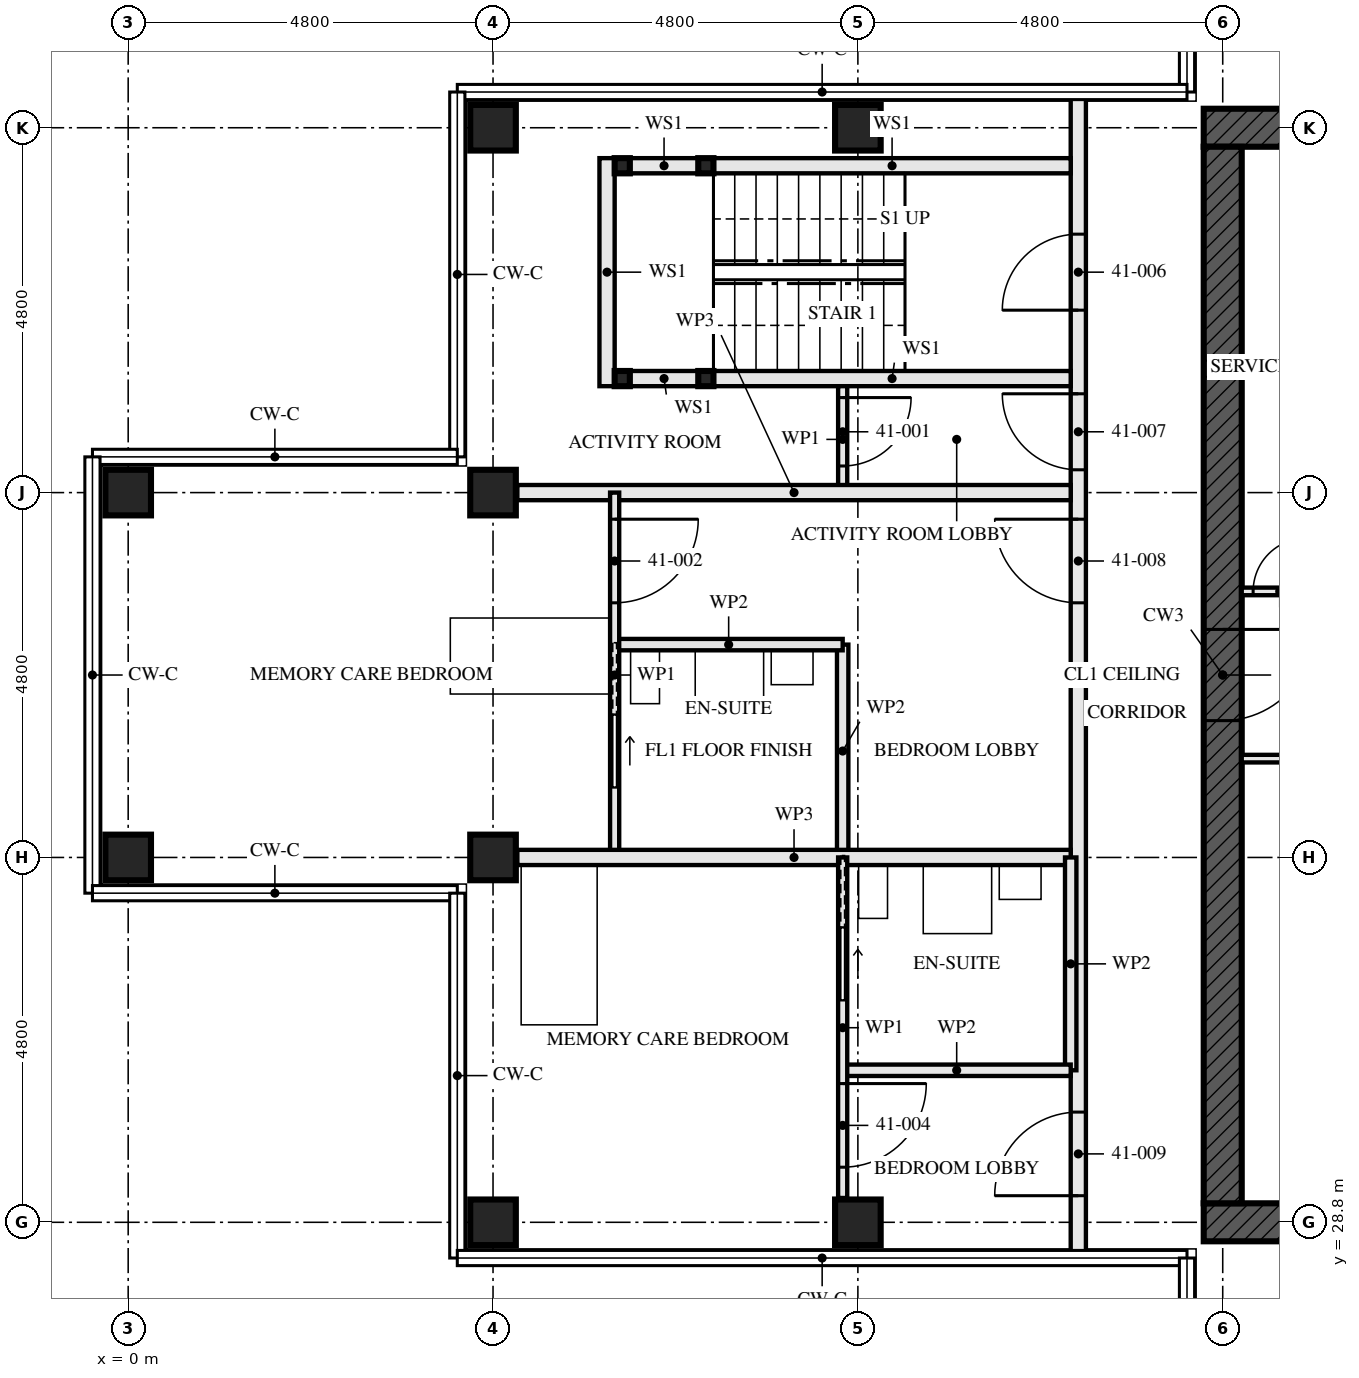
"""IFC4 building model, lengths in metres.
Left out: names, types, materials, properties, quantities, classifications, styles, units other than length and angle.
Written with IfcOpenShell. Run it as: python <this file> out.ifc"""

import sys

from ifc_helpers import new_model, si_unit, direction, frame, frame_2d, origin, origin_2d, place, context, subcontext, project, spatial, rectangle, hollow_rectangle, extrude, element, fill, save


model = new_model("IFC4")
c1 = context("Model", 3, precision=1e-05, world=origin(), true_north=direction((0.0, 1.0)))
c2 = subcontext(c1, "Body", "Model", "MODEL_VIEW")
j1 = project(units=[si_unit("LENGTHUNIT", "METRE"), si_unit("PLANEANGLEUNIT", "RADIAN")], contexts=[c1])
p1 = place(None, origin())
s1 = spatial("IfcSite", under=j1, at=p1, CompositionType="ELEMENT")
p2 = place(p1, origin())
s2 = spatial("IfcBuilding", under=s1, at=p2, CompositionType="ELEMENT")
p3 = place(p2, frame((0.0, 0.0, 151.5)))
s3 = spatial("IfcBuildingStorey", under=s2, at=p3, CompositionType="ELEMENT", Elevation=151.5)
for number, where, z_axis, x_axis in (
    (1, (0.0, 33.6, 0.0), (0.0, 0.0, 1.0), (0.0, 1.0, 0.0)),
    (2, (0.0, 38.4, 0.0), (0.0, 0.0, 1.0), (0.0, 1.0, 0.0)),
    (3, (4.8, 28.8, 0.0), (0.0, 0.0, 1.0), (0.0, 1.0, 0.0)),
    (4, (4.8, 33.6, 0.0), (0.0, 0.0, 1.0), (0.0, 1.0, 0.0)),
    (5, (4.8, 38.4, 0.0), (0.0, 0.0, 1.0), (0.0, 1.0, 0.0)),
    (6, (4.8, 43.2, 0.0), (0.0, 0.0, 1.0), (0.0, 1.0, 0.0)),
):
    element("IfcColumn", number, at=place(p3, frame(where, z_axis=z_axis, x_axis=x_axis)), inside=s3, PredefinedType="COLUMN", context=c2, shape_type="SweptSolid", body=[
        extrude(hollow_rectangle(XDim=0.6, YDim=0.6, WallThickness=0.06, at=origin_2d()), origin(), (0.0, 0.0, 1.0), 3.5),
    ])
for number, where, z_axis, x_axis in (
    (7, (9.6, 28.8, 0.0), (0.0, 0.0, 1.0), (0.0, 1.0, 0.0)),
    (8, (9.6, 43.2, 0.0), (0.0, 0.0, 1.0), (0.0, 1.0, 0.0)),
):
    element("IfcColumn", number, at=place(p3, frame(where, z_axis=z_axis, x_axis=x_axis)), inside=s3, PredefinedType="COLUMN", context=c2, shape_type="SweptSolid", body=[
        extrude(hollow_rectangle(XDim=0.6, YDim=0.6, WallThickness=0.08, at=origin_2d()), origin(), (0.0, 0.0, 1.0), 3.5),
    ])
p4 = place(p3, frame((14.15, 28.8, -0.17), z_axis=(0.0, 0.0, 1.0), x_axis=(1.0, 0.0, 0.0)))
e9 = element("IfcWall", 9, at=p4, inside=s3, PredefinedType="SHEAR", context=c2, shape_type="SweptSolid", body=[
    extrude(rectangle(XDim=14.9, YDim=0.5, at=frame_2d((7.45, 0.0))), origin(), (0.0, 0.0, 1.0), 3.5),
])
p5 = place(p4, frame((6.85, 0.0, 0.17)))
e10 = element("IfcOpeningElement", 10, at=p5, cuts=e9, PredefinedType="OPENING", context=c2, shape_type="SweptSolid", body=[
    extrude(rectangle(XDim=1.2, YDim=2.1, at=frame_2d((0.6, 1.05))), frame((0.0, 0.26, 0.0), z_axis=(0.0, -1.0, 0.0), x_axis=(1.0, 0.0, 0.0)), (0.0, 0.0, 1.0), 0.521),
])
p6 = place(p3, frame((29.05, 43.2, -0.17), z_axis=(0.0, 0.0, 1.0), x_axis=(-1.0, 0.0, 0.0)))
e11 = element("IfcWall", 11, at=p6, inside=s3, PredefinedType="SHEAR", context=c2, shape_type="SweptSolid", body=[
    extrude(rectangle(XDim=14.9, YDim=0.5, at=frame_2d((7.45, 0.0))), origin(), (0.0, 0.0, 1.0), 3.5),
])
p7 = place(p6, frame((6.85, 0.0, 0.17)))
e12 = element("IfcOpeningElement", 12, at=p7, cuts=e11, PredefinedType="OPENING", context=c2, shape_type="SweptSolid", body=[
    extrude(rectangle(XDim=1.2, YDim=2.1, at=frame_2d((0.6, 1.05))), frame((0.0, 0.26, 0.0), z_axis=(0.0, -1.0, 0.0), x_axis=(1.0, 0.0, 0.0)), (0.0, 0.0, 1.0), 0.521),
])
p8 = place(p3, frame((14.4, 42.95, -0.17), z_axis=(0.0, 0.0, 1.0), x_axis=(0.0, -1.0, 0.0)))
e13 = element("IfcWall", 13, at=p8, inside=s3, PredefinedType="SHEAR", context=c2, shape_type="SweptSolid", body=[
    extrude(rectangle(XDim=13.9, YDim=0.5, at=frame_2d((6.95, 0.0))), origin(), (0.0, 0.0, 1.0), 3.5),
])
p9 = place(p8, frame((6.35, 0.0, 0.17)))
e14 = element("IfcOpeningElement", 14, at=p9, cuts=e13, PredefinedType="OPENING", context=c2, shape_type="SweptSolid", body=[
    extrude(rectangle(XDim=1.2, YDim=2.1, at=frame_2d((0.6, 1.05))), frame((0.0, 0.26, 0.0), z_axis=(0.0, -1.0, 0.0), x_axis=(1.0, 0.0, 0.0)), (0.0, 0.0, 1.0), 0.521),
])
for number, where, z_axis, x_axis in (
    (15, (6.5, 42.7, 0.0), (0.0, 0.0, 1.0), (1.0, 0.0, 0.0)),
    (16, (6.5, 39.9, 0.0), (0.0, 0.0, 1.0), (1.0, 0.0, 0.0)),
    (17, (7.6, 42.7, 0.0), (0.0, 0.0, 1.0), (1.0, 0.0, 0.0)),
    (18, (7.6, 39.9, 0.0), (0.0, 0.0, 1.0), (1.0, 0.0, 0.0)),
):
    element("IfcColumn", number, at=place(p3, frame(where, z_axis=z_axis, x_axis=x_axis)), inside=s3, PredefinedType="COLUMN", context=c2, shape_type="SweptSolid", body=[
        extrude(hollow_rectangle(XDim=0.2, YDim=0.2, WallThickness=0.008, at=origin_2d()), origin(), (0.0, 0.0, 1.0), 3.33),
    ])
p10 = place(p3, frame((6.6, 42.7, 0.0), z_axis=(0.0, 0.0, 1.0), x_axis=(1.0, 0.0, 0.0)))
e19 = element("IfcWall", 19, at=p10, inside=s3, PredefinedType="SOLIDWALL", context=c2, shape_type="SweptSolid", body=[
    extrude(rectangle(XDim=0.9, YDim=0.2, at=frame_2d((0.45, 0.0))), origin(), (0.0, 0.0, 1.0), 2.99),
])
p11 = place(p3, frame((7.7, 42.7, 0.0), z_axis=(0.0, 0.0, 1.0), x_axis=(1.0, 0.0, 0.0)))
e20 = element("IfcWall", 20, at=p11, inside=s3, PredefinedType="SOLIDWALL", context=c2, shape_type="SweptSolid", body=[
    extrude(rectangle(XDim=4.7, YDim=0.2, at=frame_2d((2.35, 0.0))), origin(), (0.0, 0.0, 1.0), 2.99),
])
p12 = place(p3, frame((6.6, 39.9, 0.0), z_axis=(0.0, 0.0, 1.0), x_axis=(1.0, 0.0, 0.0)))
e21 = element("IfcWall", 21, at=p12, inside=s3, PredefinedType="SOLIDWALL", context=c2, shape_type="SweptSolid", body=[
    extrude(rectangle(XDim=0.9, YDim=0.2, at=frame_2d((0.45, 0.0))), origin(), (0.0, 0.0, 1.0), 2.99),
])
p13 = place(p3, frame((7.7, 39.9, 0.0), z_axis=(0.0, 0.0, 1.0), x_axis=(1.0, 0.0, 0.0)))
e22 = element("IfcWall", 22, at=p13, inside=s3, PredefinedType="SOLIDWALL", context=c2, shape_type="SweptSolid", body=[
    extrude(rectangle(XDim=4.7, YDim=0.2, at=frame_2d((2.35, 0.0))), origin(), (0.0, 0.0, 1.0), 2.99),
])
p14 = place(p3, frame((6.3, 42.8, 0.0), z_axis=(0.0, 0.0, 1.0), x_axis=(0.0, -1.0, 0.0)))
e23 = element("IfcWall", 23, at=p14, inside=s3, PredefinedType="SOLIDWALL", context=c2, shape_type="SweptSolid", body=[
    extrude(rectangle(XDim=3.0, YDim=0.2, at=frame_2d((1.5, 0.0))), origin(), (0.0, 0.0, 1.0), 3.33),
])
p15 = place(p3, frame((9.4, 39.8, 0.0), z_axis=(0.0, 0.0, 1.0), x_axis=(0.0, -1.0, 0.0)))
e24 = element("IfcWall", 24, at=p15, inside=s3, PredefinedType="PARTITIONING", context=c2, shape_type="SweptSolid", body=[
    extrude(rectangle(XDim=1.4, YDim=0.12, at=frame_2d((0.7, 0.0))), origin(), (0.0, 0.0, 1.0), 3.33),
])
p16 = place(p15, frame((0.15, 0.0, 0.0)))
e25 = element("IfcOpeningElement", 25, at=p16, cuts=e24, PredefinedType="OPENING", context=c2, shape_type="SweptSolid", body=[
    extrude(rectangle(XDim=0.9, YDim=2.1, at=frame_2d((0.45, 1.05))), frame((0.0, 0.071, 0.0), z_axis=(0.0, -1.0, 0.0), x_axis=(1.0, 0.0, 0.0)), (0.0, 0.0, 1.0), 0.141),
])
p17 = place(p3, frame((5.12, 38.4, 0.0), z_axis=(0.0, 0.0, 1.0), x_axis=(1.0, 0.0, 0.0)))
e26 = element("IfcWall", 26, at=p17, inside=s3, PredefinedType="PARTITIONING", context=c2, shape_type="SweptSolid", body=[
    extrude(rectangle(XDim=7.28, YDim=0.2, at=frame_2d((3.64, 0.0))), origin(), (0.0, 0.0, 1.0), 2.55),
])
p18 = place(p3, frame((6.4, 36.4, 0.0), z_axis=(0.0, 0.0, 1.0), x_axis=(1.0, 0.0, 0.0)))
e27 = element("IfcWall", 27, at=p18, inside=s3, PredefinedType="PARTITIONING", context=c2, shape_type="SweptSolid", body=[
    extrude(rectangle(XDim=3.0, YDim=0.15, at=frame_2d((1.5, 0.0))), origin(), (0.0, 0.0, 1.0), 3.33),
])
p19 = place(p3, frame((9.4, 36.4, 0.0), z_axis=(0.0, 0.0, 1.0), x_axis=(0.0, -1.0, 0.0)))
e28 = element("IfcWall", 28, at=p19, inside=s3, PredefinedType="PARTITIONING", context=c2, shape_type="SweptSolid", body=[
    extrude(rectangle(XDim=2.8, YDim=0.15, at=frame_2d((1.4, 0.0))), origin(), (0.0, 0.0, 1.0), 3.33),
])
p20 = place(p3, frame((6.4, 38.4, 0.0), z_axis=(0.0, 0.0, 1.0), x_axis=(0.0, -1.0, 0.0)))
e29 = element("IfcWall", 29, at=p20, inside=s3, PredefinedType="PARTITIONING", context=c2, shape_type="SweptSolid", body=[
    extrude(rectangle(XDim=4.8, YDim=0.12, at=frame_2d((2.4, 0.0))), origin(), (0.0, 0.0, 1.0), 3.33),
])
p21 = place(p20, frame((0.35, 0.0, 0.0)))
e30 = element("IfcOpeningElement", 30, at=p21, cuts=e29, PredefinedType="OPENING", context=c2, shape_type="SweptSolid", body=[
    extrude(rectangle(XDim=1.1, YDim=2.1, at=frame_2d((0.55, 1.05))), frame((0.0, 0.071, 0.0), z_axis=(0.0, -1.0, 0.0), x_axis=(1.0, 0.0, 0.0)), (0.0, 0.0, 1.0), 0.141),
])
p22 = place(p20, frame((2.925, 0.0, 0.0)))
e31 = element("IfcOpeningElement", 31, at=p22, cuts=e29, PredefinedType="OPENING", context=c2, shape_type="SweptSolid", body=[
    extrude(rectangle(XDim=0.95, YDim=2.1, at=frame_2d((0.475, 1.05))), frame((0.0, 0.071, 0.0), z_axis=(0.0, -1.0, 0.0), x_axis=(1.0, 0.0, 0.0)), (0.0, 0.0, 1.0), 0.141),
])
p23 = place(p3, frame((5.12, 33.6, 0.0), z_axis=(0.0, 0.0, 1.0), x_axis=(1.0, 0.0, 0.0)))
e32 = element("IfcWall", 32, at=p23, inside=s3, PredefinedType="PARTITIONING", context=c2, shape_type="SweptSolid", body=[
    extrude(rectangle(XDim=7.28, YDim=0.2, at=frame_2d((3.64, 0.0))), origin(), (0.0, 0.0, 1.0), 2.55),
])
p24 = place(p3, frame((9.4, 30.8, 0.0), z_axis=(0.0, 0.0, 1.0), x_axis=(1.0, 0.0, 0.0)))
e33 = element("IfcWall", 33, at=p24, inside=s3, PredefinedType="PARTITIONING", context=c2, shape_type="SweptSolid", body=[
    extrude(rectangle(XDim=3.0, YDim=0.15, at=frame_2d((1.5, 0.0))), origin(), (0.0, 0.0, 1.0), 3.33),
])
p25 = place(p3, frame((12.4, 33.6, 0.0), z_axis=(0.0, 0.0, 1.0), x_axis=(0.0, -1.0, 0.0)))
e34 = element("IfcWall", 34, at=p25, inside=s3, PredefinedType="PARTITIONING", context=c2, shape_type="SweptSolid", body=[
    extrude(rectangle(XDim=2.8, YDim=0.15, at=frame_2d((1.4, 0.0))), origin(), (0.0, 0.0, 1.0), 3.33),
])
p26 = place(p3, frame((9.4, 33.6, 0.0), z_axis=(0.0, 0.0, 1.0), x_axis=(0.0, -1.0, 0.0)))
e35 = element("IfcWall", 35, at=p26, inside=s3, PredefinedType="PARTITIONING", context=c2, shape_type="SweptSolid", body=[
    extrude(rectangle(XDim=4.48, YDim=0.12, at=frame_2d((2.24, 0.0))), origin(), (0.0, 0.0, 1.0), 3.33),
])
p27 = place(p26, frame((2.975, 0.0, 0.0)))
e36 = element("IfcOpeningElement", 36, at=p27, cuts=e35, PredefinedType="OPENING", context=c2, shape_type="SweptSolid", body=[
    extrude(rectangle(XDim=1.1, YDim=2.1, at=frame_2d((0.55, 1.05))), frame((0.0, 0.071, 0.0), z_axis=(0.0, -1.0, 0.0), x_axis=(1.0, 0.0, 0.0)), (0.0, 0.0, 1.0), 0.141),
])
p28 = place(p26, frame((0.925, 0.0, 0.0)))
e37 = element("IfcOpeningElement", 37, at=p28, cuts=e35, PredefinedType="OPENING", context=c2, shape_type="SweptSolid", body=[
    extrude(rectangle(XDim=0.95, YDim=2.1, at=frame_2d((0.475, 1.05))), frame((0.0, 0.071, 0.0), z_axis=(0.0, -1.0, 0.0), x_axis=(1.0, 0.0, 0.0)), (0.0, 0.0, 1.0), 0.141),
])
p29 = place(p3, frame((12.5, 43.65, 0.0), z_axis=(0.0, 0.0, 1.0), x_axis=(0.0, -1.0, 0.0)))
e38 = element("IfcWall", 38, at=p29, inside=s3, PredefinedType="PARTITIONING", context=c2, shape_type="SweptSolid", body=[
    extrude(rectangle(XDim=15.3, YDim=0.2, at=frame_2d((7.65, 0.0))), origin(), (0.0, 0.0, 1.0), 2.32),
])
p30 = place(p29, frame((1.85, 0.0, 0.0)))
e39 = element("IfcOpeningElement", 39, at=p30, cuts=e38, PredefinedType="OPENING", context=c2, shape_type="SweptSolid", body=[
    extrude(rectangle(XDim=1.0, YDim=2.1, at=frame_2d((0.5, 1.05))), frame((0.0, 0.111, 0.0), z_axis=(0.0, -1.0, 0.0), x_axis=(1.0, 0.0, 0.0)), (0.0, 0.0, 1.0), 0.221),
])
p31 = place(p29, frame((3.95, 0.0, 0.0)))
e40 = element("IfcOpeningElement", 40, at=p31, cuts=e38, PredefinedType="OPENING", context=c2, shape_type="SweptSolid", body=[
    extrude(rectangle(XDim=1.0, YDim=2.1, at=frame_2d((0.5, 1.05))), frame((0.0, 0.111, 0.0), z_axis=(0.0, -1.0, 0.0), x_axis=(1.0, 0.0, 0.0)), (0.0, 0.0, 1.0), 0.221),
])
p32 = place(p29, frame((5.6, 0.0, 0.0)))
e41 = element("IfcOpeningElement", 41, at=p32, cuts=e38, PredefinedType="OPENING", context=c2, shape_type="SweptSolid", body=[
    extrude(rectangle(XDim=1.1, YDim=2.1, at=frame_2d((0.55, 1.05))), frame((0.0, 0.111, 0.0), z_axis=(0.0, -1.0, 0.0), x_axis=(1.0, 0.0, 0.0)), (0.0, 0.0, 1.0), 0.221),
])
p33 = place(p29, frame((13.4, 0.0, 0.0)))
e42 = element("IfcOpeningElement", 42, at=p33, cuts=e38, PredefinedType="OPENING", context=c2, shape_type="SweptSolid", body=[
    extrude(rectangle(XDim=1.1, YDim=2.1, at=frame_2d((0.55, 1.05))), frame((0.0, 0.111, 0.0), z_axis=(0.0, -1.0, 0.0), x_axis=(1.0, 0.0, 0.0)), (0.0, 0.0, 1.0), 0.221),
])
p34 = place(p3, frame((14.65, 34.9, 0.0), z_axis=(0.0, 0.0, 1.0), x_axis=(1.0, 0.0, 0.0)))
e43 = element("IfcWall", 43, at=p34, inside=s3, PredefinedType="SOLIDWALL", context=c2, shape_type="SweptSolid", body=[
    extrude(rectangle(XDim=5.9, YDim=0.1, at=frame_2d((2.95, 0.0))), origin(), (0.0, 0.0, 1.0), 3.33),
])
p35 = place(p34, frame((1.6, 0.0, 0.0)))
e44 = element("IfcOpeningElement", 44, at=p35, cuts=e43, PredefinedType="OPENING", context=c2, shape_type="SweptSolid", body=[
    extrude(rectangle(XDim=0.7, YDim=2.1, at=frame_2d((0.35, 1.05))), frame((0.0, 0.061, 0.0), z_axis=(0.0, -1.0, 0.0), x_axis=(1.0, 0.0, 0.0)), (0.0, 0.0, 1.0), 0.121),
])
p36 = place(p3, frame((14.65, 37.1, 0.0), z_axis=(0.0, 0.0, 1.0), x_axis=(1.0, 0.0, 0.0)))
e45 = element("IfcWall", 45, at=p36, inside=s3, PredefinedType="SOLIDWALL", context=c2, shape_type="SweptSolid", body=[
    extrude(rectangle(XDim=5.9, YDim=0.1, at=frame_2d((2.95, 0.0))), origin(), (0.0, 0.0, 1.0), 3.33),
])
p37 = place(p36, frame((0.15, 0.0, 0.0)))
e46 = element("IfcOpeningElement", 46, at=p37, cuts=e45, PredefinedType="OPENING", context=c2, shape_type="SweptSolid", body=[
    extrude(rectangle(XDim=0.7, YDim=2.1, at=frame_2d((0.35, 1.05))), frame((0.0, 0.061, 0.0), z_axis=(0.0, -1.0, 0.0), x_axis=(1.0, 0.0, 0.0)), (0.0, 0.0, 1.0), 0.121),
])
p38 = place(p36, frame((1.5, 0.0, 0.0)))
e47 = element("IfcOpeningElement", 47, at=p38, cuts=e45, PredefinedType="OPENING", context=c2, shape_type="SweptSolid", body=[
    extrude(rectangle(XDim=0.9, YDim=2.1, at=frame_2d((0.45, 1.05))), frame((0.0, 0.061, 0.0), z_axis=(0.0, -1.0, 0.0), x_axis=(1.0, 0.0, 0.0)), (0.0, 0.0, 1.0), 0.121),
])
p39 = place(p16, origin())
e48 = element("IfcDoor", 48, at=p39, inside=s3, OperationType="SINGLE_SWING_RIGHT", PredefinedType="DOOR", context=c2, shape_type="SweptSolid", body=[
    extrude(rectangle(XDim=0.9, YDim=2.1, at=frame_2d((0.45, 1.05))), frame((0.0, 0.022, 0.0), z_axis=(0.0, -1.0, 0.0), x_axis=(1.0, 0.0, 0.0)), (0.0, 0.0, 1.0), 0.044),
])
fill(e25, e48)
p40 = place(p21, origin())
e49 = element("IfcDoor", 49, at=p40, inside=s3, OperationType="SINGLE_SWING_RIGHT", PredefinedType="DOOR", context=c2, shape_type="SweptSolid", body=[
    extrude(rectangle(XDim=1.1, YDim=2.1, at=frame_2d((0.55, 1.05))), frame((0.0, 0.022, 0.0), z_axis=(0.0, -1.0, 0.0), x_axis=(1.0, 0.0, 0.0)), (0.0, 0.0, 1.0), 0.044),
])
fill(e30, e49)
p41 = place(p22, origin())
e50 = element("IfcDoor", 50, at=p41, inside=s3, OperationType="SLIDING_TO_RIGHT", PredefinedType="DOOR", context=c2, shape_type="SweptSolid", body=[
    extrude(rectangle(XDim=0.95, YDim=2.1, at=frame_2d((0.475, 1.05))), frame((0.0, 0.022, 0.0), z_axis=(0.0, -1.0, 0.0), x_axis=(1.0, 0.0, 0.0)), (0.0, 0.0, 1.0), 0.044),
])
fill(e31, e50)
p42 = place(p27, origin())
e51 = element("IfcDoor", 51, at=p42, inside=s3, OperationType="SINGLE_SWING_RIGHT", PredefinedType="DOOR", context=c2, shape_type="SweptSolid", body=[
    extrude(rectangle(XDim=1.1, YDim=2.1, at=frame_2d((0.55, 1.05))), frame((0.0, 0.022, 0.0), z_axis=(0.0, -1.0, 0.0), x_axis=(1.0, 0.0, 0.0)), (0.0, 0.0, 1.0), 0.044),
])
fill(e36, e51)
p43 = place(p28, origin())
e52 = element("IfcDoor", 52, at=p43, inside=s3, OperationType="SLIDING_TO_RIGHT", PredefinedType="DOOR", context=c2, shape_type="SweptSolid", body=[
    extrude(rectangle(XDim=0.95, YDim=2.1, at=frame_2d((0.475, 1.05))), frame((0.0, 0.022, 0.0), z_axis=(0.0, -1.0, 0.0), x_axis=(1.0, 0.0, 0.0)), (0.0, 0.0, 1.0), 0.044),
])
fill(e37, e52)
p44 = place(p30, frame((1.0, 0.0, 0.0), z_axis=(0.0, 0.0, 1.0), x_axis=(-1.0, 0.0, 0.0)))
e53 = element("IfcDoor", 53, at=p44, inside=s3, OperationType="SINGLE_SWING_RIGHT", PredefinedType="DOOR", context=c2, shape_type="SweptSolid", body=[
    extrude(rectangle(XDim=1.0, YDim=2.1, at=frame_2d((0.5, 1.05))), frame((0.0, 0.032, 0.0), z_axis=(0.0, -1.0, 0.0), x_axis=(1.0, 0.0, 0.0)), (0.0, 0.0, 1.0), 0.064),
])
fill(e39, e53)
p45 = place(p31, frame((1.0, 0.0, 0.0), z_axis=(0.0, 0.0, 1.0), x_axis=(-1.0, 0.0, 0.0)))
e54 = element("IfcDoor", 54, at=p45, inside=s3, OperationType="SINGLE_SWING_LEFT", PredefinedType="DOOR", context=c2, shape_type="SweptSolid", body=[
    extrude(rectangle(XDim=1.0, YDim=2.1, at=frame_2d((0.5, 1.05))), frame((0.0, 0.027, 0.0), z_axis=(0.0, -1.0, 0.0), x_axis=(1.0, 0.0, 0.0)), (0.0, 0.0, 1.0), 0.054),
])
fill(e40, e54)
p46 = place(p32, frame((1.1, 0.0, 0.0), z_axis=(0.0, 0.0, 1.0), x_axis=(-1.0, 0.0, 0.0)))
e55 = element("IfcDoor", 55, at=p46, inside=s3, OperationType="SINGLE_SWING_LEFT", PredefinedType="DOOR", context=c2, shape_type="SweptSolid", body=[
    extrude(rectangle(XDim=1.1, YDim=2.1, at=frame_2d((0.55, 1.05))), frame((0.0, 0.027, 0.0), z_axis=(0.0, -1.0, 0.0), x_axis=(1.0, 0.0, 0.0)), (0.0, 0.0, 1.0), 0.054),
])
fill(e41, e55)
p47 = place(p33, frame((1.1, 0.0, 0.0), z_axis=(0.0, 0.0, 1.0), x_axis=(-1.0, 0.0, 0.0)))
e56 = element("IfcDoor", 56, at=p47, inside=s3, OperationType="SINGLE_SWING_RIGHT", PredefinedType="DOOR", context=c2, shape_type="SweptSolid", body=[
    extrude(rectangle(XDim=1.1, YDim=2.1, at=frame_2d((0.55, 1.05))), frame((0.0, 0.027, 0.0), z_axis=(0.0, -1.0, 0.0), x_axis=(1.0, 0.0, 0.0)), (0.0, 0.0, 1.0), 0.054),
])
fill(e42, e56)
p48 = place(p37, origin())
e57 = element("IfcDoor", 57, at=p48, inside=s3, OperationType="SINGLE_SWING_LEFT", PredefinedType="DOOR", context=c2, shape_type="SweptSolid", body=[
    extrude(rectangle(XDim=0.7, YDim=2.1, at=frame_2d((0.35, 1.05))), frame((0.0, 0.027, 0.0), z_axis=(0.0, -1.0, 0.0), x_axis=(1.0, 0.0, 0.0)), (0.0, 0.0, 1.0), 0.054),
])
fill(e46, e57)
p49 = place(p9, origin())
e58 = element("IfcDoor", 58, at=p49, inside=s3, OperationType="SINGLE_SWING_LEFT", PredefinedType="DOOR", context=c2, shape_type="SweptSolid", body=[
    extrude(rectangle(XDim=1.2, YDim=2.1, at=frame_2d((0.6, 1.05))), frame((0.0, 0.027, 0.0), z_axis=(0.0, -1.0, 0.0), x_axis=(1.0, 0.0, 0.0)), (0.0, 0.0, 1.0), 0.054),
])
fill(e14, e58)
save(model, sys.argv[1])
